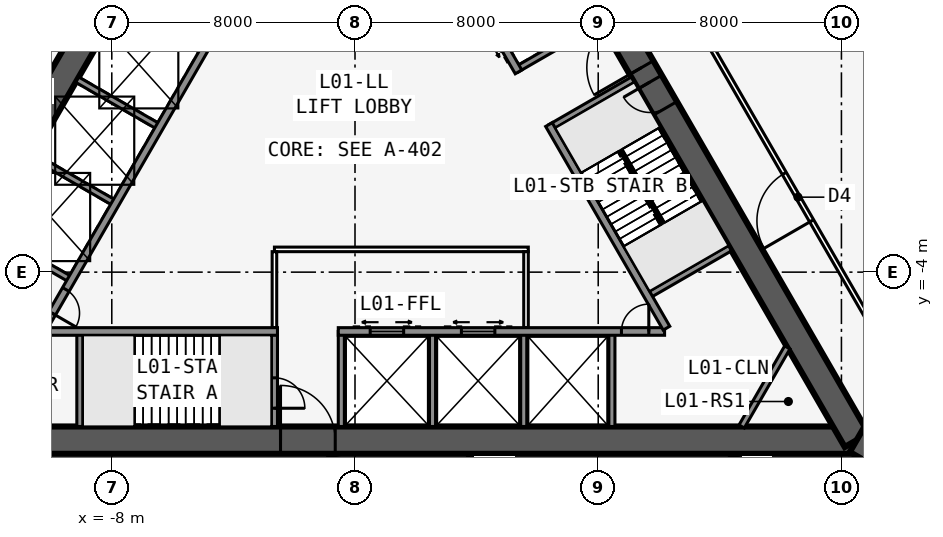
"""IFC4 building model, lengths in metres.
Left out: names, types, materials, properties, quantities, classifications, styles, units other than length and angle.
Written with IfcOpenShell. Run it as: python <this file> out.ifc"""

import sys

from ifc_helpers import new_model, si_unit, direction, frame, frame_2d, origin, place, context, subcontext, project, spatial, rectangle, extrude, element, fill, save


model = new_model("IFC4")
c1 = context("Model", 3, precision=1e-05, world=origin(), true_north=direction((0.0, 1.0)))
c2 = subcontext(c1, "Body", "Model", "MODEL_VIEW")
j1 = project(units=[si_unit("LENGTHUNIT", "METRE"), si_unit("PLANEANGLEUNIT", "RADIAN")], contexts=[c1])
p1 = place(None, origin())
s1 = spatial("IfcSite", under=j1, at=p1, CompositionType="ELEMENT")
p2 = place(p1, origin())
s2 = spatial("IfcBuilding", under=s1, at=p2, CompositionType="ELEMENT")
p3 = place(p2, frame((0.0, 0.0, 6.0)))
s3 = spatial("IfcBuildingStorey", under=s2, at=p3, CompositionType="ELEMENT", Elevation=6.0)
p4 = place(p3, frame((-16.5, -9.526, 0.0), z_axis=(0.0, 0.0, 1.0), x_axis=(1.0, 0.0, 0.0)))
e1 = element("IfcWall", 1, at=p4, inside=s3, PredefinedType="SHEAR", context=c2, shape_type="SweptSolid", body=[
    extrude(rectangle(XDim=33.0, YDim=0.9, at=frame_2d((16.5, 0.0))), origin(), (0.0, 0.0, 1.0), 5.0),
])
p5 = place(p4, frame((14.05, 0.0, 0.0)))
e2 = element("IfcOpeningElement", 2, at=p5, cuts=e1, PredefinedType="OPENING", context=c2, shape_type="SweptSolid", body=[
    extrude(rectangle(XDim=1.8, YDim=2.13, at=frame_2d((0.9, 1.065))), frame((0.0, 0.46, 0.0), z_axis=(0.0, -1.0, 0.0), x_axis=(1.0, 0.0, 0.0)), (0.0, 0.0, 1.0), 0.92),
])
p6 = place(p3, frame((-10.183, -5.951, 0.0), z_axis=(0.0, 0.0, 1.0), x_axis=(1.0, 0.0, 0.0)))
e3 = element("IfcWall", 3, at=p6, inside=s3, PredefinedType="SOLIDWALL", context=c2, shape_type="SweptSolid", body=[
    extrude(rectangle(XDim=7.633, YDim=0.25, at=frame_2d((3.816, 0.0))), origin(), (0.0, 0.0, 1.0), 4.75),
])
p7 = place(p3, frame((-0.55, -5.951, 0.0), z_axis=(0.0, 0.0, 1.0), x_axis=(1.0, 0.0, 0.0)))
e4 = element("IfcWall", 4, at=p7, inside=s3, PredefinedType="SOLIDWALL", context=c2, shape_type="SweptSolid", body=[
    extrude(rectangle(XDim=10.733, YDim=0.25, at=frame_2d((5.366, 0.0))), origin(), (0.0, 0.0, 1.0), 4.75),
])
p8 = place(p7, frame((9.314, 0.0, 0.0)))
e5 = element("IfcOpeningElement", 5, at=p8, cuts=e4, PredefinedType="OPENING", context=c2, shape_type="SweptSolid", body=[
    extrude(rectangle(XDim=0.9, YDim=2.13, at=frame_2d((0.45, 1.065))), frame((0.0, 0.135, 0.0), z_axis=(0.0, -1.0, 0.0), x_axis=(1.0, 0.0, 0.0)), (0.0, 0.0, 1.0), 0.27),
])
p9 = place(p7, frame((1.05, 0.0, 0.0)))
e6 = element("IfcOpeningElement", 6, at=p9, cuts=e4, PredefinedType="OPENING", context=c2, shape_type="SweptSolid", body=[
    extrude(rectangle(XDim=1.1, YDim=2.13, at=frame_2d((0.55, 1.065))), frame((0.0, 0.135, 0.0), z_axis=(0.0, -1.0, 0.0), x_axis=(1.0, 0.0, 0.0)), (0.0, 0.0, 1.0), 0.27),
])
p10 = place(p7, frame((4.05, 0.0, 0.0)))
e7 = element("IfcOpeningElement", 7, at=p10, cuts=e4, PredefinedType="OPENING", context=c2, shape_type="SweptSolid", body=[
    extrude(rectangle(XDim=1.1, YDim=2.13, at=frame_2d((0.55, 1.065))), frame((0.0, 0.135, 0.0), z_axis=(0.0, -1.0, 0.0), x_axis=(1.0, 0.0, 0.0)), (0.0, 0.0, 1.0), 0.27),
])
p11 = place(p3, frame((-9.05, -5.951, 0.0), z_axis=(0.0, 0.0, 1.0), x_axis=(0.0, -1.0, 0.0)))
e8 = element("IfcWall", 8, at=p11, inside=s3, PredefinedType="SOLIDWALL", context=c2, shape_type="SweptSolid", body=[
    extrude(rectangle(XDim=3.125, YDim=0.2, at=frame_2d((1.562, 0.0))), origin(), (0.0, 0.0, 1.0), 4.75),
])
p12 = place(p3, frame((-2.65, -5.951, 0.0), z_axis=(0.0, 0.0, 1.0), x_axis=(0.0, -1.0, 0.0)))
e9 = element("IfcWall", 9, at=p12, inside=s3, PredefinedType="SOLIDWALL", context=c2, shape_type="SweptSolid", body=[
    extrude(rectangle(XDim=3.125, YDim=0.2, at=frame_2d((1.562, 0.0))), origin(), (0.0, 0.0, 1.0), 4.75),
])
p13 = place(p12, frame((1.525, 0.0, 0.0)))
e10 = element("IfcOpeningElement", 10, at=p13, cuts=e9, PredefinedType="OPENING", context=c2, shape_type="SweptSolid", body=[
    extrude(rectangle(XDim=1.0, YDim=2.13, at=frame_2d((0.5, 1.065))), frame((0.0, 0.11, 0.0), z_axis=(0.0, -1.0, 0.0), x_axis=(1.0, 0.0, 0.0)), (0.0, 0.0, 1.0), 0.22),
])
for number, where, z_axis, x_axis in (
    (11, (-0.45, -5.951, 0.0), (0.0, 0.0, 1.0), (0.0, -1.0, 0.0)),
    (12, (2.55, -5.951, 0.0), (0.0, 0.0, 1.0), (0.0, -1.0, 0.0)),
    (13, (5.55, -5.951, 0.0), (0.0, 0.0, 1.0), (0.0, -1.0, 0.0)),
    (14, (8.45, -5.951, 0.0), (0.0, 0.0, 1.0), (0.0, -1.0, 0.0)),
):
    element("IfcWall", number, at=place(p3, frame(where, z_axis=z_axis, x_axis=x_axis)), inside=s3, PredefinedType="SOLIDWALL", context=c2, shape_type="SweptSolid", body=[
        extrude(rectangle(XDim=3.125, YDim=0.2, at=frame_2d((1.562, 0.0))), origin(), (0.0, 0.0, 1.0), 4.75),
    ])
p14 = place(p3, frame((16.5, -9.526, 0.0), z_axis=(0.0, 0.0, 1.0), x_axis=(-0.499999749417, 0.866025548458, 0.0)))
e15 = element("IfcWall", 15, at=p14, inside=s3, PredefinedType="SHEAR", context=c2, shape_type="SweptSolid", body=[
    extrude(rectangle(XDim=33.0, YDim=0.9, at=frame_2d((16.5, 0.0))), origin(), (0.0, 0.0, 1.0), 5.0),
])
p15 = place(p14, frame((14.15, 0.0, 0.0)))
e16 = element("IfcOpeningElement", 16, at=p15, cuts=e15, PredefinedType="OPENING", context=c2, shape_type="SweptSolid", body=[
    extrude(rectangle(XDim=1.8, YDim=2.13, at=frame_2d((0.9, 1.065))), frame((0.0, 0.46, 0.0), z_axis=(0.0, -1.0, 0.0), x_axis=(1.0, 0.0, 0.0)), (0.0, 0.0, 1.0), 0.92),
])
p16 = place(p14, frame((12.6, 0.0, 0.0)))
e17 = element("IfcOpeningElement", 17, at=p16, cuts=e15, PredefinedType="OPENING", context=c2, shape_type="SweptSolid", body=[
    extrude(rectangle(XDim=1.0, YDim=2.13, at=frame_2d((0.5, 1.065))), frame((0.0, 0.46, 0.0), z_axis=(0.0, -1.0, 0.0), x_axis=(1.0, 0.0, 0.0)), (0.0, 0.0, 1.0), 0.92),
])
p17 = place(p3, frame((10.245, -5.843, 0.0), z_axis=(0.0, 0.0, 1.0), x_axis=(-0.499993009313, 0.866029439822, 0.0)))
e18 = element("IfcWall", 18, at=p17, inside=s3, PredefinedType="SOLIDWALL", context=c2, shape_type="SweptSolid", body=[
    extrude(rectangle(XDim=7.733, YDim=0.25, at=frame_2d((3.866, 0.0))), origin(), (0.0, 0.0, 1.0), 4.75),
])
p18 = place(p3, frame((5.379, 2.586, 0.0), z_axis=(0.0, 0.0, 1.0), x_axis=(-0.500001375892, 0.866024609411, 0.0)))
e19 = element("IfcWall", 19, at=p18, inside=s3, PredefinedType="SOLIDWALL", context=c2, shape_type="SweptSolid", body=[
    extrude(rectangle(XDim=10.633, YDim=0.25, at=frame_2d((5.316, 0.0))), origin(), (0.0, 0.0, 1.0), 4.75),
])
p19 = place(p18, frame((9.164, 0.0, 0.0)))
e20 = element("IfcOpeningElement", 20, at=p19, cuts=e19, PredefinedType="OPENING", context=c2, shape_type="SweptSolid", body=[
    extrude(rectangle(XDim=0.9, YDim=2.13, at=frame_2d((0.45, 1.065))), frame((0.0, 0.135, 0.0), z_axis=(0.0, -1.0, 0.0), x_axis=(1.0, 0.0, 0.0)), (0.0, 0.0, 1.0), 0.27),
])
p20 = place(p18, frame((1.0, 0.0, 0.0)))
e21 = element("IfcOpeningElement", 21, at=p20, cuts=e19, PredefinedType="OPENING", context=c2, shape_type="SweptSolid", body=[
    extrude(rectangle(XDim=1.1, YDim=2.13, at=frame_2d((0.55, 1.065))), frame((0.0, 0.135, 0.0), z_axis=(0.0, -1.0, 0.0), x_axis=(1.0, 0.0, 0.0)), (0.0, 0.0, 1.0), 0.27),
])
p21 = place(p18, frame((3.9, 0.0, 0.0)))
e22 = element("IfcOpeningElement", 22, at=p21, cuts=e19, PredefinedType="OPENING", context=c2, shape_type="SweptSolid", body=[
    extrude(rectangle(XDim=1.1, YDim=2.13, at=frame_2d((0.55, 1.065))), frame((0.0, 0.135, 0.0), z_axis=(0.0, -1.0, 0.0), x_axis=(1.0, 0.0, 0.0)), (0.0, 0.0, 1.0), 0.27),
])
p22 = place(p18, frame((6.8, 0.0, 0.0)))
e23 = element("IfcOpeningElement", 23, at=p22, cuts=e19, PredefinedType="OPENING", context=c2, shape_type="SweptSolid", body=[
    extrude(rectangle(XDim=1.1, YDim=2.13, at=frame_2d((0.55, 1.065))), frame((0.0, 0.135, 0.0), z_axis=(0.0, -1.0, 0.0), x_axis=(1.0, 0.0, 0.0)), (0.0, 0.0, 1.0), 0.27),
])
for number, where, z_axis, x_axis in (
    (24, (9.629, -4.775, 0.0), (0.0, 0.0, 1.0), (0.866, 0.5, 0.0)),
    (25, (6.429, 0.767, 0.0), (0.0, 0.0, 1.0), (0.866, 0.5, 0.0)),
    (26, (5.329, 2.673, 0.0), (0.0, 0.0, 1.0), (0.866, 0.5, 0.0)),
):
    element("IfcWall", number, at=place(p3, frame(where, z_axis=z_axis, x_axis=x_axis)), inside=s3, PredefinedType="SOLIDWALL", context=c2, shape_type="SweptSolid", body=[
        extrude(rectangle(XDim=3.125, YDim=0.2, at=frame_2d((1.562, 0.0))), origin(), (0.0, 0.0, 1.0), 4.75),
    ])
p23 = place(p3, frame((0.0, 19.052, 0.0), z_axis=(0.0, 0.0, 1.0), x_axis=(-0.499999749417, -0.866025548458, 0.0)))
e27 = element("IfcWall", 27, at=p23, inside=s3, PredefinedType="SHEAR", context=c2, shape_type="SweptSolid", body=[
    extrude(rectangle(XDim=33.0, YDim=0.9, at=frame_2d((16.5, 0.0))), origin(), (0.0, 0.0, 1.0), 5.0),
])
p24 = place(p23, frame((14.15, 0.0, 0.0)))
e28 = element("IfcOpeningElement", 28, at=p24, cuts=e27, PredefinedType="OPENING", context=c2, shape_type="SweptSolid", body=[
    extrude(rectangle(XDim=1.8, YDim=2.13, at=frame_2d((0.9, 1.065))), frame((0.0, 0.46, 0.0), z_axis=(0.0, -1.0, 0.0), x_axis=(1.0, 0.0, 0.0)), (0.0, 0.0, 1.0), 0.92),
])
p25 = place(p23, frame((12.6, 0.0, 0.0)))
e29 = element("IfcOpeningElement", 29, at=p25, cuts=e27, PredefinedType="OPENING", context=c2, shape_type="SweptSolid", body=[
    extrude(rectangle(XDim=1.0, YDim=2.13, at=frame_2d((0.5, 1.065))), frame((0.0, 0.46, 0.0), z_axis=(0.0, -1.0, 0.0), x_axis=(1.0, 0.0, 0.0)), (0.0, 0.0, 1.0), 0.92),
])
p26 = place(p3, frame((-4.929, 3.365, 0.0), z_axis=(0.0, 0.0, 1.0), x_axis=(-0.499991433582, -0.866030349552, 0.0)))
e30 = element("IfcWall", 30, at=p26, inside=s3, PredefinedType="SOLIDWALL", context=c2, shape_type="SweptSolid", body=[
    extrude(rectangle(XDim=10.633, YDim=0.25, at=frame_2d((5.316, 0.0))), origin(), (0.0, 0.0, 1.0), 4.75),
])
p27 = place(p26, frame((9.164, 0.0, 0.0)))
e31 = element("IfcOpeningElement", 31, at=p27, cuts=e30, PredefinedType="OPENING", context=c2, shape_type="SweptSolid", body=[
    extrude(rectangle(XDim=0.9, YDim=2.13, at=frame_2d((0.45, 1.065))), frame((0.0, 0.135, 0.0), z_axis=(0.0, -1.0, 0.0), x_axis=(1.0, 0.0, 0.0)), (0.0, 0.0, 1.0), 0.27),
])
for number, where, z_axis, x_axis in (
    (32, (-4.979, 3.279, 0.0), (0.0, 0.0, 1.0), (-0.866, 0.5, 0.0)),
    (33, (-6.429, 0.767, 0.0), (0.0, 0.0, 1.0), (-0.866, 0.5, 0.0)),
    (34, (-7.879, -1.744, 0.0), (0.0, 0.0, 1.0), (-0.866, 0.5, 0.0)),
    (35, (-9.329, -4.256, 0.0), (0.0, 0.0, 1.0), (-0.866, 0.5, 0.0)),
):
    element("IfcWall", number, at=place(p3, frame(where, z_axis=z_axis, x_axis=x_axis)), inside=s3, PredefinedType="SOLIDWALL", context=c2, shape_type="SweptSolid", body=[
        extrude(rectangle(XDim=3.125, YDim=0.2, at=frame_2d((1.562, 0.0))), origin(), (0.0, 0.0, 1.0), 4.75),
    ])
p28 = place(p3, frame((16.5, -9.526, 0.0), z_axis=(0.0, 0.0, 1.0), x_axis=(0.866031398331, -0.499989616998, 0.0)))
e36 = element("IfcWall", 36, at=p28, inside=s3, PredefinedType="SHEAR", context=c2, shape_type="SweptSolid", body=[
    extrude(rectangle(XDim=4.746, YDim=0.9, at=frame_2d((2.373, 0.0))), origin(), (0.0, 0.0, 1.0), 5.0),
])
p29 = place(p28, frame((1.8, 0.0, 0.0)))
e37 = element("IfcOpeningElement", 37, at=p29, cuts=e36, PredefinedType="OPENING", context=c2, shape_type="SweptSolid", body=[
    extrude(rectangle(XDim=1.8, YDim=2.13, at=frame_2d((0.9, 1.065))), frame((0.0, 0.46, 0.0), z_axis=(0.0, -1.0, 0.0), x_axis=(1.0, 0.0, 0.0)), (0.0, 0.0, 1.0), 0.92),
])
p30 = place(p3, frame((20.027, -10.985, 0.0), z_axis=(0.0, 0.0, 1.0), x_axis=(-0.500001677587, 0.866024435227, 0.0)))
e38 = element("IfcWall", 38, at=p30, inside=s3, PredefinedType="PARTITIONING", context=c2, shape_type="SweptSolid", body=[
    extrude(rectangle(XDim=39.054, YDim=0.15, at=frame_2d((19.527, 0.0))), origin(), (0.0, 0.0, 1.0), 3.808),
])
p31 = place(p30, frame((10.013, 0.0, 0.0)))
e39 = element("IfcOpeningElement", 39, at=p31, cuts=e38, PredefinedType="OPENING", context=c2, shape_type="SweptSolid", body=[
    extrude(rectangle(XDim=1.8, YDim=2.13, at=frame_2d((0.9, 1.065))), frame((0.0, 0.085, 0.0), z_axis=(0.0, -1.0, 0.0), x_axis=(1.0, 0.0, 0.0)), (0.0, 0.0, 1.0), 0.17),
])
p32 = place(p30, frame((23.227, 0.0, 0.0)))
e40 = element("IfcOpeningElement", 40, at=p32, cuts=e38, PredefinedType="OPENING", context=c2, shape_type="SweptSolid", body=[
    extrude(rectangle(XDim=1.8, YDim=2.13, at=frame_2d((0.9, 1.065))), frame((0.0, 0.085, 0.0), z_axis=(0.0, -1.0, 0.0), x_axis=(1.0, 0.0, 0.0)), (0.0, 0.0, 1.0), 0.17),
])
p33 = place(p30, frame((27.627, 0.0, 0.0)))
e41 = element("IfcOpeningElement", 41, at=p33, cuts=e38, PredefinedType="OPENING", context=c2, shape_type="SweptSolid", body=[
    extrude(rectangle(XDim=1.0, YDim=2.13, at=frame_2d((0.5, 1.065))), frame((0.0, 0.085, 0.0), z_axis=(0.0, -1.0, 0.0), x_axis=(1.0, 0.0, 0.0)), (0.0, 0.0, 1.0), 0.17),
])
p34 = place(p30, frame((30.527, 0.0, 0.0)))
e42 = element("IfcOpeningElement", 42, at=p34, cuts=e38, PredefinedType="OPENING", context=c2, shape_type="SweptSolid", body=[
    extrude(rectangle(XDim=1.0, YDim=2.13, at=frame_2d((0.5, 1.065))), frame((0.0, 0.085, 0.0), z_axis=(0.0, -1.0, 0.0), x_axis=(1.0, 0.0, 0.0)), (0.0, 0.0, 1.0), 0.17),
])
p35 = place(p30, frame((33.277, 0.0, 0.0)))
e43 = element("IfcOpeningElement", 43, at=p35, cuts=e38, PredefinedType="OPENING", context=c2, shape_type="SweptSolid", body=[
    extrude(rectangle(XDim=1.0, YDim=2.13, at=frame_2d((0.5, 1.065))), frame((0.0, 0.085, 0.0), z_axis=(0.0, -1.0, 0.0), x_axis=(1.0, 0.0, 0.0)), (0.0, 0.0, 1.0), 0.17),
])
p36 = place(p30, frame((36.39, 0.0, 0.0)))
e44 = element("IfcOpeningElement", 44, at=p36, cuts=e38, PredefinedType="OPENING", context=c2, shape_type="SweptSolid", body=[
    extrude(rectangle(XDim=1.0, YDim=2.13, at=frame_2d((0.5, 1.065))), frame((0.0, 0.085, 0.0), z_axis=(0.0, -1.0, 0.0), x_axis=(1.0, 0.0, 0.0)), (0.0, 0.0, 1.0), 0.17),
])
p37 = place(p3, frame((-0.5, 22.836, 0.0), z_axis=(0.0, 0.0, 1.0), x_axis=(-0.500001677587, -0.866024435227, 0.0)))
e45 = element("IfcWall", 45, at=p37, inside=s3, PredefinedType="PARTITIONING", context=c2, shape_type="SweptSolid", body=[
    extrude(rectangle(XDim=39.054, YDim=0.15, at=frame_2d((19.527, 0.0))), origin(), (0.0, 0.0, 1.0), 3.808),
])
p38 = place(p37, frame((10.013, 0.0, 0.0)))
e46 = element("IfcOpeningElement", 46, at=p38, cuts=e45, PredefinedType="OPENING", context=c2, shape_type="SweptSolid", body=[
    extrude(rectangle(XDim=1.8, YDim=2.13, at=frame_2d((0.9, 1.065))), frame((0.0, 0.085, 0.0), z_axis=(0.0, -1.0, 0.0), x_axis=(1.0, 0.0, 0.0)), (0.0, 0.0, 1.0), 0.17),
])
p39 = place(p37, frame((23.227, 0.0, 0.0)))
e47 = element("IfcOpeningElement", 47, at=p39, cuts=e45, PredefinedType="OPENING", context=c2, shape_type="SweptSolid", body=[
    extrude(rectangle(XDim=1.8, YDim=2.13, at=frame_2d((0.9, 1.065))), frame((0.0, 0.085, 0.0), z_axis=(0.0, -1.0, 0.0), x_axis=(1.0, 0.0, 0.0)), (0.0, 0.0, 1.0), 0.17),
])
p40 = place(p37, frame((27.627, 0.0, 0.0)))
e48 = element("IfcOpeningElement", 48, at=p40, cuts=e45, PredefinedType="OPENING", context=c2, shape_type="SweptSolid", body=[
    extrude(rectangle(XDim=1.0, YDim=2.13, at=frame_2d((0.5, 1.065))), frame((0.0, 0.085, 0.0), z_axis=(0.0, -1.0, 0.0), x_axis=(1.0, 0.0, 0.0)), (0.0, 0.0, 1.0), 0.17),
])
p41 = place(p37, frame((30.277, 0.0, 0.0)))
e49 = element("IfcOpeningElement", 49, at=p41, cuts=e45, PredefinedType="OPENING", context=c2, shape_type="SweptSolid", body=[
    extrude(rectangle(XDim=1.0, YDim=2.13, at=frame_2d((0.5, 1.065))), frame((0.0, 0.085, 0.0), z_axis=(0.0, -1.0, 0.0), x_axis=(1.0, 0.0, 0.0)), (0.0, 0.0, 1.0), 0.17),
])
p42 = place(p37, frame((34.89, 0.0, 0.0)))
e50 = element("IfcOpeningElement", 50, at=p42, cuts=e45, PredefinedType="OPENING", context=c2, shape_type="SweptSolid", body=[
    extrude(rectangle(XDim=1.0, YDim=2.13, at=frame_2d((0.5, 1.065))), frame((0.0, 0.085, 0.0), z_axis=(0.0, -1.0, 0.0), x_axis=(1.0, 0.0, 0.0)), (0.0, 0.0, 1.0), 0.17),
])
p43 = place(p3, frame((-2.65, -3.251, 0.0), z_axis=(0.0, 0.0, 1.0), x_axis=(1.0, 0.0, 0.0)))
e51 = element("IfcWall", 51, at=p43, inside=s3, PredefinedType="PARTITIONING", context=c2, shape_type="SweptSolid", body=[
    extrude(rectangle(XDim=8.35, YDim=0.15, at=frame_2d((4.175, 0.0))), origin(), (0.0, 0.0, 1.0), 4.75),
])
for number, where, z_axis, x_axis in (
    (52, (-2.65, -5.826, 0.0), (0.0, 0.0, 1.0), (0.0, 1.0, 0.0)),
    (53, (5.625, -5.826, 0.0), (0.0, 0.0, 1.0), (0.0, 1.0, 0.0)),
):
    element("IfcWall", number, at=place(p3, frame(where, z_axis=z_axis, x_axis=x_axis)), inside=s3, PredefinedType="PARTITIONING", context=c2, shape_type="SweptSolid", body=[
        extrude(rectangle(XDim=2.5, YDim=0.15, at=frame_2d((1.25, 0.0))), origin(), (0.0, 0.0, 1.0), 4.75),
    ])
p44 = place(p3, frame((14.219, -6.476, 0.0), z_axis=(0.0, 0.0, 1.0), x_axis=(-0.499952404951, -0.866052881055, 0.0)))
e54 = element("IfcWall", 54, at=p44, inside=s3, PredefinedType="SOLIDWALL", context=c2, shape_type="SweptSolid", body=[
    extrude(rectangle(XDim=3.002, YDim=0.2, at=frame_2d((1.501, 0.0))), origin(), (0.0, 0.0, 1.0), 4.75),
])
p45 = place(p3, frame((-7.247, -7.576, 0.0), z_axis=(0.0, 0.0, 1.0), x_axis=(1.0, 0.0, 0.0)))
e55 = element("IfcWall", 55, at=p45, inside=s3, PredefinedType="SOLIDWALL", context=c2, shape_type="SweptSolid", body=[
    extrude(rectangle(XDim=2.794, YDim=0.1, at=frame_2d((1.397, 0.0))), origin(), (0.0, 0.0, 1.0), 5.0),
])
p46 = place(p3, frame((10.135, -2.401, 0.0), z_axis=(0.0, 0.0, 1.0), x_axis=(-0.499992232847, 0.866029888106, 0.0)))
e56 = element("IfcWall", 56, at=p46, inside=s3, PredefinedType="SOLIDWALL", context=c2, shape_type="SweptSolid", body=[
    extrude(rectangle(XDim=2.794, YDim=0.1, at=frame_2d((1.397, 0.0))), origin(), (0.0, 0.0, 1.0), 5.0),
])
p47 = place(p31, origin())
e57 = element("IfcDoor", 57, at=p47, inside=s3, OperationType="DOUBLE_DOOR_SINGLE_SWING", PredefinedType="DOOR", context=c2, shape_type="SweptSolid", body=[
    extrude(rectangle(XDim=1.8, YDim=2.13, at=frame_2d((0.9, 1.065))), frame((0.0, 0.025, 0.0), z_axis=(0.0, -1.0, 0.0), x_axis=(1.0, 0.0, 0.0)), (0.0, 0.0, 1.0), 0.05),
])
fill(e39, e57)
p48 = place(p5, origin())
e58 = element("IfcDoor", 58, at=p48, inside=s3, OperationType="DOUBLE_DOOR_SINGLE_SWING", PredefinedType="DOOR", context=c2, shape_type="SweptSolid", body=[
    extrude(rectangle(XDim=1.8, YDim=2.13, at=frame_2d((0.9, 1.065))), frame((0.0, 0.025, 0.0), z_axis=(0.0, -1.0, 0.0), x_axis=(1.0, 0.0, 0.0)), (0.0, 0.0, 1.0), 0.05),
])
fill(e2, e58)
p49 = place(p13, origin())
e59 = element("IfcDoor", 59, at=p49, inside=s3, OperationType="SINGLE_SWING_RIGHT", PredefinedType="DOOR", context=c2, shape_type="SweptSolid", body=[
    extrude(rectangle(XDim=1.0, YDim=2.13, at=frame_2d((0.5, 1.065))), frame((0.0, 0.025, 0.0), z_axis=(0.0, -1.0, 0.0), x_axis=(1.0, 0.0, 0.0)), (0.0, 0.0, 1.0), 0.05),
])
fill(e10, e59)
p50 = place(p15, origin())
e60 = element("IfcDoor", 60, at=p50, inside=s3, OperationType="DOUBLE_DOOR_SINGLE_SWING", PredefinedType="DOOR", context=c2, shape_type="SweptSolid", body=[
    extrude(rectangle(XDim=1.8, YDim=2.13, at=frame_2d((0.9, 1.065))), frame((0.0, 0.025, 0.0), z_axis=(0.0, -1.0, 0.0), x_axis=(1.0, 0.0, 0.0)), (0.0, 0.0, 1.0), 0.05),
])
fill(e16, e60)
p51 = place(p16, origin())
e61 = element("IfcDoor", 61, at=p51, inside=s3, OperationType="SINGLE_SWING_RIGHT", PredefinedType="DOOR", context=c2, shape_type="SweptSolid", body=[
    extrude(rectangle(XDim=1.0, YDim=2.13, at=frame_2d((0.5, 1.065))), frame((0.0, 0.025, 0.0), z_axis=(0.0, -1.0, 0.0), x_axis=(1.0, 0.0, 0.0)), (0.0, 0.0, 1.0), 0.05),
])
fill(e17, e61)
p52 = place(p8, origin())
e62 = element("IfcDoor", 62, at=p52, inside=s3, OperationType="SINGLE_SWING_RIGHT", PredefinedType="DOOR", context=c2, shape_type="SweptSolid", body=[
    extrude(rectangle(XDim=0.9, YDim=2.13, at=frame_2d((0.45, 1.065))), frame((0.0, 0.025, 0.0), z_axis=(0.0, -1.0, 0.0), x_axis=(1.0, 0.0, 0.0)), (0.0, 0.0, 1.0), 0.05),
])
fill(e5, e62)
p53 = place(p27, origin())
e63 = element("IfcDoor", 63, at=p53, inside=s3, OperationType="SINGLE_SWING_RIGHT", PredefinedType="DOOR", context=c2, shape_type="SweptSolid", body=[
    extrude(rectangle(XDim=0.9, YDim=2.13, at=frame_2d((0.45, 1.065))), frame((0.0, 0.025, 0.0), z_axis=(0.0, -1.0, 0.0), x_axis=(1.0, 0.0, 0.0)), (0.0, 0.0, 1.0), 0.05),
])
fill(e31, e63)
p54 = place(p9, origin())
e64 = element("IfcDoor", 64, at=p54, inside=s3, OperationType="DOUBLE_DOOR_SLIDING", PredefinedType="USERDEFINED", context=c2, shape_type="SweptSolid", body=[
    extrude(rectangle(XDim=1.1, YDim=2.13, at=frame_2d((0.55, 1.065))), frame((0.0, 0.025, 0.0), z_axis=(0.0, -1.0, 0.0), x_axis=(1.0, 0.0, 0.0)), (0.0, 0.0, 1.0), 0.05),
])
fill(e6, e64)
p55 = place(p10, origin())
e65 = element("IfcDoor", 65, at=p55, inside=s3, OperationType="DOUBLE_DOOR_SLIDING", PredefinedType="USERDEFINED", context=c2, shape_type="SweptSolid", body=[
    extrude(rectangle(XDim=1.1, YDim=2.13, at=frame_2d((0.55, 1.065))), frame((0.0, 0.025, 0.0), z_axis=(0.0, -1.0, 0.0), x_axis=(1.0, 0.0, 0.0)), (0.0, 0.0, 1.0), 0.05),
])
fill(e7, e65)
save(model, sys.argv[1])
